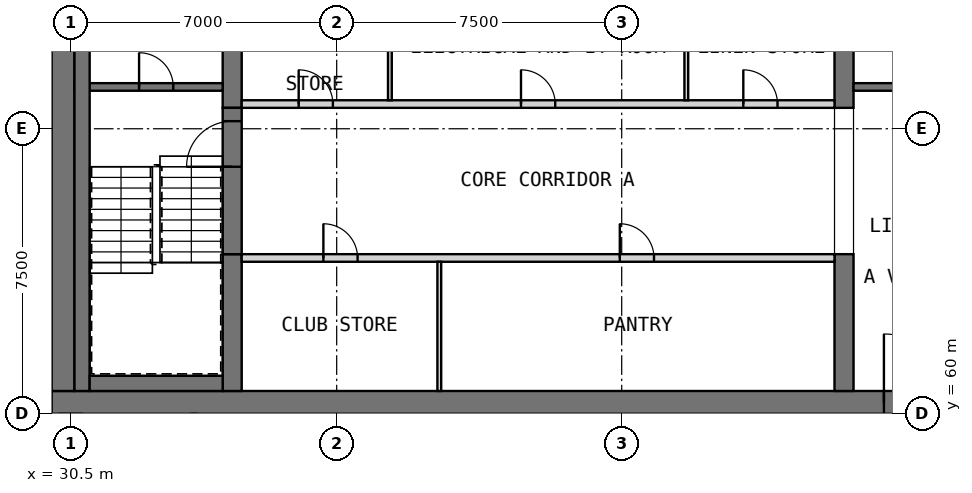
"""IFC4 building model, lengths in metres.
Left out: names, types, materials, properties, quantities, classifications, styles, units other than length and angle.
Written with IfcOpenShell. Run it as: python <this file> out.ifc"""

import sys

from ifc_helpers import new_model, si_unit, direction, frame, frame_2d, origin, place, context, subcontext, project, spatial, rectangle, extrude, element, fill, save


model = new_model("IFC4")
c1 = context("Model", 3, precision=1e-05, world=origin(), true_north=direction((0.0, 1.0)))
c2 = subcontext(c1, "Body", "Model", "MODEL_VIEW")
j1 = project(units=[si_unit("LENGTHUNIT", "METRE"), si_unit("PLANEANGLEUNIT", "RADIAN")], contexts=[c1])
p1 = place(None, origin())
s1 = spatial("IfcSite", under=j1, at=p1, CompositionType="ELEMENT")
p2 = place(p1, origin())
s2 = spatial("IfcBuilding", under=s1, at=p2, CompositionType="ELEMENT")
p3 = place(p2, frame((0.0, 0.0, 266.2)))
s3 = spatial("IfcBuildingStorey", under=s2, at=p3, CompositionType="ELEMENT", Elevation=266.2)
p4 = place(p3, frame((30.0, 60.3, 0.0), z_axis=(0.0, 0.0, 1.0), x_axis=(1.0, 0.0, 0.0)))
e1 = element("IfcWall", 1, at=p4, inside=s3, PredefinedType="SHEAR", context=c2, shape_type="SweptSolid", body=[
    extrude(rectangle(XDim=30.0, YDim=0.6, at=frame_2d((15.0, 0.0))), origin(), (0.0, 0.0, 1.0), 3.5),
])
p5 = place(p4, frame((21.9, 0.0, 0.0)))
e2 = element("IfcOpeningElement", 2, at=p5, cuts=e1, PredefinedType="OPENING", context=c2, shape_type="SweptSolid", body=[
    extrude(rectangle(XDim=1.8, YDim=2.1, at=frame_2d((0.9, 1.05))), frame((0.0, 0.31, 0.0), z_axis=(0.0, -1.0, 0.0), x_axis=(1.0, 0.0, 0.0)), (0.0, 0.0, 1.0), 0.62),
])
p6 = place(p4, frame((26.5, 0.0, 0.0)))
e3 = element("IfcOpeningElement", 3, at=p6, cuts=e1, PredefinedType="OPENING", context=c2, shape_type="SweptSolid", body=[
    extrude(rectangle(XDim=1.2, YDim=2.1, at=frame_2d((0.6, 1.05))), frame((0.0, 0.31, 0.0), z_axis=(0.0, -1.0, 0.0), x_axis=(1.0, 0.0, 0.0)), (0.0, 0.0, 1.0), 0.62),
])
p7 = place(p3, frame((30.3, 60.6, 0.0), z_axis=(0.0, 0.0, 1.0), x_axis=(0.0, 1.0, 0.0)))
e4 = element("IfcWall", 4, at=p7, inside=s3, PredefinedType="SHEAR", context=c2, shape_type="SweptSolid", body=[
    extrude(rectangle(XDim=21.3, YDim=0.6, at=frame_2d((10.65, 0.0))), origin(), (0.0, 0.0, 1.0), 3.5),
])
p8 = place(p3, frame((34.75, 60.6, 0.0), z_axis=(0.0, 0.0, 1.0), x_axis=(0.0, 1.0, 0.0)))
e5 = element("IfcWall", 5, at=p8, inside=s3, PredefinedType="SHEAR", context=c2, shape_type="SweptSolid", body=[
    extrude(rectangle(XDim=3.6, YDim=0.5, at=frame_2d((1.8, 0.0))), origin(), (0.0, 0.0, 1.0), 3.5),
])
p9 = place(p3, frame((34.75, 68.05, 0.0), z_axis=(0.0, 0.0, 1.0), x_axis=(0.0, 1.0, 0.0)))
e6 = element("IfcWall", 6, at=p9, inside=s3, PredefinedType="SHEAR", context=c2, shape_type="SweptSolid", body=[
    extrude(rectangle(XDim=6.4, YDim=0.5, at=frame_2d((3.2, 0.0))), origin(), (0.0, 0.0, 1.0), 3.5),
])
p10 = place(p3, frame((50.85, 60.6, 0.0), z_axis=(0.0, 0.0, 1.0), x_axis=(0.0, 1.0, 0.0)))
e7 = element("IfcWall", 7, at=p10, inside=s3, PredefinedType="SHEAR", context=c2, shape_type="SweptSolid", body=[
    extrude(rectangle(XDim=3.6, YDim=0.5, at=frame_2d((1.8, 0.0))), origin(), (0.0, 0.0, 1.0), 3.5),
])
p11 = place(p3, frame((50.85, 68.05, 0.0), z_axis=(0.0, 0.0, 1.0), x_axis=(0.0, 1.0, 0.0)))
e8 = element("IfcWall", 8, at=p11, inside=s3, PredefinedType="SHEAR", context=c2, shape_type="SweptSolid", body=[
    extrude(rectangle(XDim=6.4, YDim=0.5, at=frame_2d((3.2, 0.0))), origin(), (0.0, 0.0, 1.0), 3.5),
])
p12 = place(p3, frame((35.0, 64.1, 0.0), z_axis=(0.0, 0.0, 1.0), x_axis=(1.0, 0.0, 0.0)))
e9 = element("IfcWall", 9, at=p12, inside=s3, PredefinedType="PARTITIONING", context=c2, shape_type="SweptSolid", body=[
    extrude(rectangle(XDim=15.6, YDim=0.2, at=frame_2d((7.8, 0.0))), origin(), (0.0, 0.0, 1.0), 3.25),
])
p13 = place(p12, frame((2.15, 0.0, 0.0)))
e10 = element("IfcOpeningElement", 10, at=p13, cuts=e9, PredefinedType="OPENING", context=c2, shape_type="SweptSolid", body=[
    extrude(rectangle(XDim=0.9, YDim=2.1, at=frame_2d((0.45, 1.05))), frame((0.0, 0.11, 0.0), z_axis=(0.0, -1.0, 0.0), x_axis=(1.0, 0.0, 0.0)), (0.0, 0.0, 1.0), 0.22),
])
p14 = place(p12, frame((9.95, 0.0, 0.0)))
e11 = element("IfcOpeningElement", 11, at=p14, cuts=e9, PredefinedType="OPENING", context=c2, shape_type="SweptSolid", body=[
    extrude(rectangle(XDim=0.9, YDim=2.1, at=frame_2d((0.45, 1.05))), frame((0.0, 0.11, 0.0), z_axis=(0.0, -1.0, 0.0), x_axis=(1.0, 0.0, 0.0)), (0.0, 0.0, 1.0), 0.22),
])
p15 = place(p3, frame((40.2, 60.6, 0.0), z_axis=(0.0, 0.0, 1.0), x_axis=(0.0, 1.0, 0.0)))
e12 = element("IfcWall", 12, at=p15, inside=s3, PredefinedType="PARTITIONING", context=c2, shape_type="SweptSolid", body=[
    extrude(rectangle(XDim=3.4, YDim=0.1, at=frame_2d((1.7, 0.0))), origin(), (0.0, 0.0, 1.0), 3.25),
])
p16 = place(p3, frame((35.0, 68.15, 0.0), z_axis=(0.0, 0.0, 1.0), x_axis=(1.0, 0.0, 0.0)))
e13 = element("IfcWall", 13, at=p16, inside=s3, PredefinedType="PARTITIONING", context=c2, shape_type="SweptSolid", body=[
    extrude(rectangle(XDim=15.6, YDim=0.2, at=frame_2d((7.8, 0.0))), origin(), (0.0, 0.0, 1.0), 3.25),
])
p17 = place(p16, frame((1.5, 0.0, 0.0)))
e14 = element("IfcOpeningElement", 14, at=p17, cuts=e13, PredefinedType="OPENING", context=c2, shape_type="SweptSolid", body=[
    extrude(rectangle(XDim=0.9, YDim=2.1, at=frame_2d((0.45, 1.05))), frame((0.0, 0.11, 0.0), z_axis=(0.0, -1.0, 0.0), x_axis=(1.0, 0.0, 0.0)), (0.0, 0.0, 1.0), 0.22),
])
p18 = place(p16, frame((7.35, 0.0, 0.0)))
e15 = element("IfcOpeningElement", 15, at=p18, cuts=e13, PredefinedType="OPENING", context=c2, shape_type="SweptSolid", body=[
    extrude(rectangle(XDim=0.9, YDim=2.1, at=frame_2d((0.45, 1.05))), frame((0.0, 0.11, 0.0), z_axis=(0.0, -1.0, 0.0), x_axis=(1.0, 0.0, 0.0)), (0.0, 0.0, 1.0), 0.22),
])
p19 = place(p16, frame((13.2, 0.0, 0.0)))
e16 = element("IfcOpeningElement", 16, at=p19, cuts=e13, PredefinedType="OPENING", context=c2, shape_type="SweptSolid", body=[
    extrude(rectangle(XDim=0.9, YDim=2.1, at=frame_2d((0.45, 1.05))), frame((0.0, 0.11, 0.0), z_axis=(0.0, -1.0, 0.0), x_axis=(1.0, 0.0, 0.0)), (0.0, 0.0, 1.0), 0.22),
])
for number, where, z_axis, x_axis in (
    (17, (38.9, 68.25, 0.0), (0.0, 0.0, 1.0), (0.0, 1.0, 0.0)),
    (18, (46.7, 68.25, 0.0), (0.0, 0.0, 1.0), (0.0, 1.0, 0.0)),
):
    element("IfcWall", number, at=place(p3, frame(where, z_axis=z_axis, x_axis=x_axis)), inside=s3, PredefinedType="PARTITIONING", context=c2, shape_type="SweptSolid", body=[
        extrude(rectangle(XDim=2.75, YDim=0.1, at=frame_2d((1.375, 0.0))), origin(), (0.0, 0.0, 1.0), 3.25),
    ])
p20 = place(p3, frame((34.75, 64.2, 0.0), z_axis=(0.0, 0.0, 1.0), x_axis=(0.0, 1.0, 0.0)))
e19 = element("IfcWall", 19, at=p20, inside=s3, PredefinedType="SOLIDWALL", context=c2, shape_type="SweptSolid", body=[
    extrude(rectangle(XDim=3.85, YDim=0.5, at=frame_2d((1.925, 0.0))), origin(), (0.0, 0.0, 1.0), 2.3),
])
p21 = place(p20, frame((2.3, 0.0, 0.0)))
e20 = element("IfcOpeningElement", 20, at=p21, cuts=e19, PredefinedType="OPENING", context=c2, shape_type="SweptSolid", body=[
    extrude(rectangle(XDim=1.2, YDim=2.1, at=frame_2d((0.6, 1.05))), frame((0.0, 0.26, 0.0), z_axis=(0.0, -1.0, 0.0), x_axis=(1.0, 0.0, 0.0)), (0.0, 0.0, 1.0), 0.52),
])
p22 = place(p3, frame((30.6, 68.6, 0.0), z_axis=(0.0, 0.0, 1.0), x_axis=(1.0, 0.0, 0.0)))
e21 = element("IfcWall", 21, at=p22, inside=s3, PredefinedType="SOLIDWALL", context=c2, shape_type="SweptSolid", body=[
    extrude(rectangle(XDim=3.9, YDim=0.2, at=frame_2d((1.95, 0.0))), origin(), (0.0, 0.0, 1.0), 3.25),
])
p23 = place(p22, frame((1.7, 0.0, 0.0)))
e22 = element("IfcOpeningElement", 22, at=p23, cuts=e21, PredefinedType="OPENING", context=c2, shape_type="SweptSolid", body=[
    extrude(rectangle(XDim=0.9, YDim=2.1, at=frame_2d((0.45, 1.05))), frame((0.0, 0.11, 0.0), z_axis=(0.0, -1.0, 0.0), x_axis=(1.0, 0.0, 0.0)), (0.0, 0.0, 1.0), 0.22),
])
p24 = place(p3, frame((51.1, 68.6, 0.0), z_axis=(0.0, 0.0, 1.0), x_axis=(1.0, 0.0, 0.0)))
e23 = element("IfcWall", 23, at=p24, inside=s3, PredefinedType="SOLIDWALL", context=c2, shape_type="SweptSolid", body=[
    extrude(rectangle(XDim=8.3, YDim=0.2, at=frame_2d((4.15, 0.0))), origin(), (0.0, 0.0, 1.0), 3.25),
])
p25 = place(p3, frame((30.8, 60.6, 0.0), z_axis=(0.0, 0.0, 1.0), x_axis=(0.0, 1.0, 0.0)))
e24 = element("IfcWall", 24, at=p25, inside=s3, PredefinedType="SOLIDWALL", context=c2, shape_type="SweptSolid", body=[
    extrude(rectangle(XDim=21.3, YDim=0.4, at=frame_2d((10.65, 0.0))), origin(), (0.0, 0.0, 1.0), 3.25),
])
p26 = place(p3, frame((31.0, 60.8, 0.0), z_axis=(0.0, 0.0, 1.0), x_axis=(1.0, 0.0, 0.0)))
e25 = element("IfcWall", 25, at=p26, inside=s3, PredefinedType="SOLIDWALL", context=c2, shape_type="SweptSolid", body=[
    extrude(rectangle(XDim=3.5, YDim=0.4, at=frame_2d((1.75, 0.0))), origin(), (0.0, 0.0, 1.0), 3.25),
])
p27 = place(p13, origin())
e26 = element("IfcDoor", 26, at=p27, inside=s3, OperationType="SINGLE_SWING_RIGHT", PredefinedType="DOOR", context=c2, shape_type="SweptSolid", body=[
    extrude(rectangle(XDim=0.9, YDim=2.1, at=frame_2d((0.45, 1.05))), frame((0.0, 0.025, 0.0), z_axis=(0.0, -1.0, 0.0), x_axis=(1.0, 0.0, 0.0)), (0.0, 0.0, 1.0), 0.05),
])
fill(e10, e26)
p28 = place(p14, origin())
e27 = element("IfcDoor", 27, at=p28, inside=s3, OperationType="SINGLE_SWING_LEFT", PredefinedType="DOOR", context=c2, shape_type="SweptSolid", body=[
    extrude(rectangle(XDim=0.9, YDim=2.1, at=frame_2d((0.45, 1.05))), frame((0.0, 0.025, 0.0), z_axis=(0.0, -1.0, 0.0), x_axis=(1.0, 0.0, 0.0)), (0.0, 0.0, 1.0), 0.05),
])
fill(e11, e27)
p29 = place(p17, origin())
e28 = element("IfcDoor", 28, at=p29, inside=s3, OperationType="SINGLE_SWING_RIGHT", PredefinedType="DOOR", context=c2, shape_type="SweptSolid", body=[
    extrude(rectangle(XDim=0.9, YDim=2.1, at=frame_2d((0.45, 1.05))), frame((0.0, 0.025, 0.0), z_axis=(0.0, -1.0, 0.0), x_axis=(1.0, 0.0, 0.0)), (0.0, 0.0, 1.0), 0.05),
])
fill(e14, e28)
p30 = place(p18, origin())
e29 = element("IfcDoor", 29, at=p30, inside=s3, OperationType="SINGLE_SWING_LEFT", PredefinedType="DOOR", context=c2, shape_type="SweptSolid", body=[
    extrude(rectangle(XDim=0.9, YDim=2.1, at=frame_2d((0.45, 1.05))), frame((0.0, 0.025, 0.0), z_axis=(0.0, -1.0, 0.0), x_axis=(1.0, 0.0, 0.0)), (0.0, 0.0, 1.0), 0.05),
])
fill(e15, e29)
p31 = place(p19, origin())
e30 = element("IfcDoor", 30, at=p31, inside=s3, OperationType="SINGLE_SWING_RIGHT", PredefinedType="DOOR", context=c2, shape_type="SweptSolid", body=[
    extrude(rectangle(XDim=0.9, YDim=2.1, at=frame_2d((0.45, 1.05))), frame((0.0, 0.025, 0.0), z_axis=(0.0, -1.0, 0.0), x_axis=(1.0, 0.0, 0.0)), (0.0, 0.0, 1.0), 0.05),
])
fill(e16, e30)
p32 = place(p5, origin())
e31 = element("IfcDoor", 31, at=p32, inside=s3, OperationType="DOUBLE_DOOR_SINGLE_SWING", PredefinedType="DOOR", context=c2, shape_type="SweptSolid", body=[
    extrude(rectangle(XDim=1.8, YDim=2.1, at=frame_2d((0.9, 1.05))), frame((0.0, 0.025, 0.0), z_axis=(0.0, -1.0, 0.0), x_axis=(1.0, 0.0, 0.0)), (0.0, 0.0, 1.0), 0.05),
])
fill(e2, e31)
p33 = place(p21, origin())
e32 = element("IfcDoor", 32, at=p33, inside=s3, OperationType="SINGLE_SWING_LEFT", PredefinedType="DOOR", context=c2, shape_type="SweptSolid", body=[
    extrude(rectangle(XDim=1.2, YDim=2.1, at=frame_2d((0.6, 1.05))), frame((0.0, 0.025, 0.0), z_axis=(0.0, -1.0, 0.0), x_axis=(1.0, 0.0, 0.0)), (0.0, 0.0, 1.0), 0.05),
])
fill(e20, e32)
p34 = place(p23, origin())
e33 = element("IfcDoor", 33, at=p34, inside=s3, OperationType="SINGLE_SWING_LEFT", PredefinedType="DOOR", context=c2, shape_type="SweptSolid", body=[
    extrude(rectangle(XDim=0.9, YDim=2.1, at=frame_2d((0.45, 1.05))), frame((0.0, 0.025, 0.0), z_axis=(0.0, -1.0, 0.0), x_axis=(1.0, 0.0, 0.0)), (0.0, 0.0, 1.0), 0.05),
])
fill(e22, e33)
save(model, sys.argv[1])
